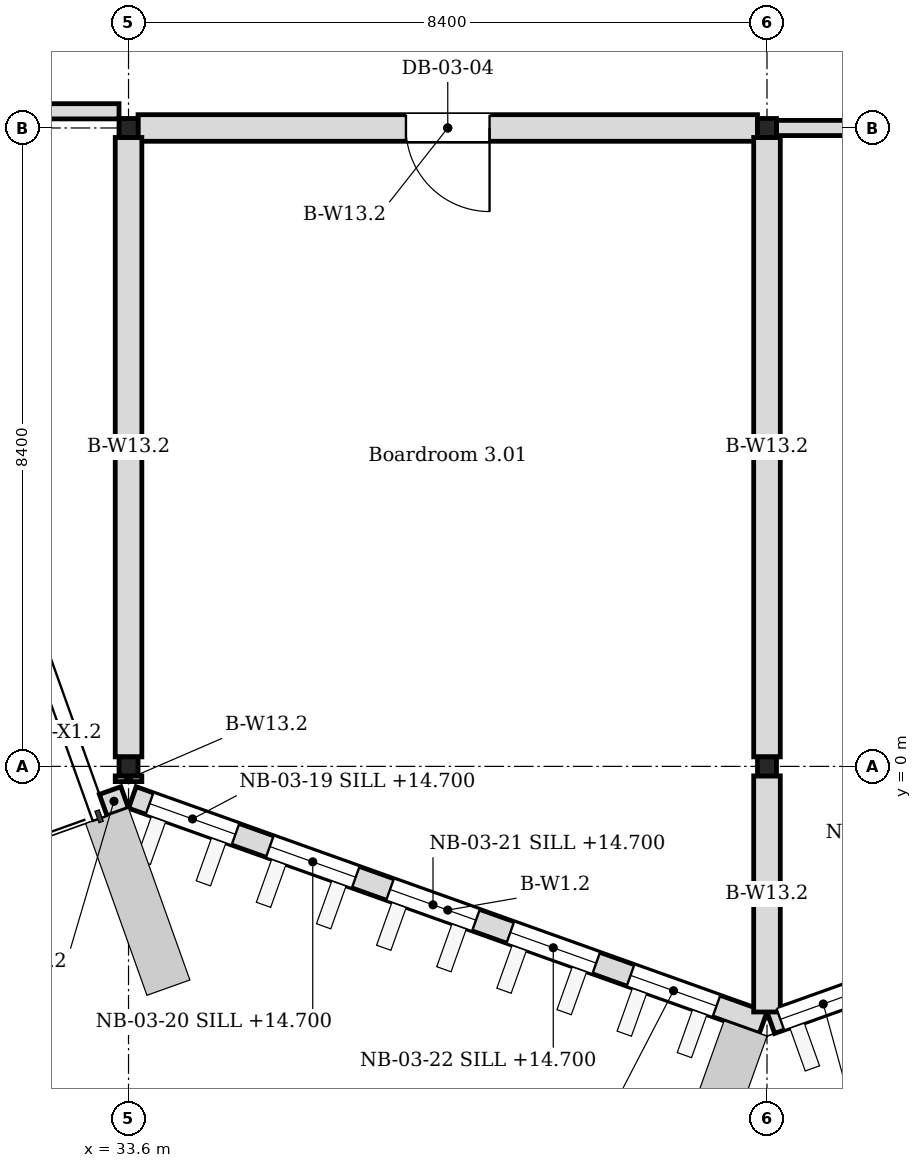
"""IFC4 building model, lengths in metres.
Left out: names, types, materials, properties, quantities, classifications, styles, units other than length and angle.
Written with IfcOpenShell. Run it as: python <this file> out.ifc"""

import sys

from ifc_helpers import new_model, si_unit, direction, frame, frame_2d, origin, origin_2d, place, context, subcontext, project, spatial, rectangle, i_section, extrude, element, fill, save


model = new_model("IFC4")
c1 = context("Model", 3, precision=1e-05, world=origin(), true_north=direction((0.0, 1.0)))
c2 = subcontext(c1, "Body", "Model", "MODEL_VIEW")
j1 = project(units=[si_unit("LENGTHUNIT", "METRE"), si_unit("PLANEANGLEUNIT", "RADIAN")], contexts=[c1])
p1 = place(None, origin())
s1 = spatial("IfcSite", under=j1, at=p1, CompositionType="ELEMENT")
p2 = place(p1, origin())
s2 = spatial("IfcBuilding", under=s1, at=p2, CompositionType="ELEMENT")
p3 = place(p2, frame((0.0, 0.0, 14.4)))
s3 = spatial("IfcBuildingStorey", under=s2, at=p3, CompositionType="ELEMENT", Elevation=14.4)
for number, where, z_axis, x_axis in (
    (1, (33.6, 0.0, 0.0), (0.0, 0.0, 1.0), (1.0, 0.0, 0.0)),
    (2, (33.6, 8.4, 0.0), (0.0, 0.0, 1.0), (1.0, 0.0, 0.0)),
    (3, (42.0, 0.0, 0.0), (0.0, 0.0, 1.0), (1.0, 0.0, 0.0)),
    (4, (42.0, 8.4, 0.0), (0.0, 0.0, 1.0), (1.0, 0.0, 0.0)),
):
    element("IfcColumn", number, at=place(p3, frame(where, z_axis=z_axis, x_axis=x_axis)), inside=s3, PredefinedType="COLUMN", context=c2, shape_type="SweptSolid", body=[
        extrude(i_section(OverallWidth=0.25, OverallDepth=0.25, WebThickness=0.009, FlangeThickness=0.014, FilletRadius=0.013, at=origin_2d()), origin(), (0.0, 0.0, 1.0), 3.95),
    ])
p4 = place(p3, frame((33.267, -0.51, 0.0), z_axis=(0.0, 0.0, 1.0), x_axis=(0.941797147708, 0.336181695768, 0.0)))
e5 = element("IfcWall", 5, at=p4, inside=s3, PredefinedType="SOLIDWALL", context=c2, shape_type="SweptSolid", body=[
    extrude(rectangle(XDim=0.3, YDim=0.3, at=frame_2d((0.15, 0.0))), origin(), (0.0, 0.0, 1.0), 3.95),
])
p5 = place(p3, frame((33.65, -0.409, 0.0), z_axis=(0.0, 0.0, 1.0), x_axis=(0.941736270411, -0.336352191894, 0.0)))
e6 = element("IfcWall", 6, at=p5, inside=s3, PredefinedType="SOLIDWALL", context=c2, shape_type="SweptSolid", body=[
    extrude(rectangle(XDim=8.812, YDim=0.3, at=frame_2d((4.406, 0.0))), origin(), (0.0, 0.0, 1.0), 3.95),
])
p6 = place(p5, frame((0.24, 0.0, 0.3)))
e7 = element("IfcOpeningElement", 7, at=p6, cuts=e6, PredefinedType="OPENING", context=c2, shape_type="SweptSolid", body=[
    extrude(rectangle(XDim=1.2, YDim=3.3, at=frame_2d((0.6, 1.65))), frame((0.0, 0.16, 0.0), z_axis=(0.0, -1.0, 0.0), x_axis=(1.0, 0.0, 0.0)), (0.0, 0.0, 1.0), 0.32),
])
p7 = place(p5, frame((1.92, 0.0, 0.3)))
e8 = element("IfcOpeningElement", 8, at=p7, cuts=e6, PredefinedType="OPENING", context=c2, shape_type="SweptSolid", body=[
    extrude(rectangle(XDim=1.2, YDim=3.3, at=frame_2d((0.6, 1.65))), frame((0.0, 0.16, 0.0), z_axis=(0.0, -1.0, 0.0), x_axis=(1.0, 0.0, 0.0)), (0.0, 0.0, 1.0), 0.32),
])
p8 = place(p5, frame((3.6, 0.0, 0.3)))
e9 = element("IfcOpeningElement", 9, at=p8, cuts=e6, PredefinedType="OPENING", context=c2, shape_type="SweptSolid", body=[
    extrude(rectangle(XDim=1.2, YDim=3.3, at=frame_2d((0.6, 1.65))), frame((0.0, 0.16, 0.0), z_axis=(0.0, -1.0, 0.0), x_axis=(1.0, 0.0, 0.0)), (0.0, 0.0, 1.0), 0.32),
])
p9 = place(p5, frame((5.28, 0.0, 0.3)))
e10 = element("IfcOpeningElement", 10, at=p9, cuts=e6, PredefinedType="OPENING", context=c2, shape_type="SweptSolid", body=[
    extrude(rectangle(XDim=1.2, YDim=3.3, at=frame_2d((0.6, 1.65))), frame((0.0, 0.16, 0.0), z_axis=(0.0, -1.0, 0.0), x_axis=(1.0, 0.0, 0.0)), (0.0, 0.0, 1.0), 0.32),
])
p10 = place(p5, frame((6.96, 0.0, 0.3)))
e11 = element("IfcOpeningElement", 11, at=p10, cuts=e6, PredefinedType="OPENING", context=c2, shape_type="SweptSolid", body=[
    extrude(rectangle(XDim=1.2, YDim=3.3, at=frame_2d((0.6, 1.65))), frame((0.0, 0.16, 0.0), z_axis=(0.0, -1.0, 0.0), x_axis=(1.0, 0.0, 0.0)), (0.0, 0.0, 1.0), 0.32),
])
p11 = place(p3, frame((42.051, -3.373, 0.0), z_axis=(0.0, 0.0, 1.0), x_axis=(0.941736270411, 0.336352191894, 0.0)))
e12 = element("IfcWall", 12, at=p11, inside=s3, PredefinedType="SOLIDWALL", context=c2, shape_type="SweptSolid", body=[
    extrude(rectangle(XDim=8.812, YDim=0.3, at=frame_2d((4.406, 0.0))), origin(), (0.0, 0.0, 1.0), 3.95),
])
p12 = place(p11, frame((0.133, 0.0, 0.3)))
e13 = element("IfcOpeningElement", 13, at=p12, cuts=e12, PredefinedType="OPENING", context=c2, shape_type="SweptSolid", body=[
    extrude(rectangle(XDim=1.2, YDim=3.3, at=frame_2d((0.6, 1.65))), frame((0.0, 0.16, 0.0), z_axis=(0.0, -1.0, 0.0), x_axis=(1.0, 0.0, 0.0)), (0.0, 0.0, 1.0), 0.32),
])
p13 = place(p11, frame((1.813, 0.0, 0.3)))
e14 = element("IfcOpeningElement", 14, at=p13, cuts=e12, PredefinedType="OPENING", context=c2, shape_type="SweptSolid", body=[
    extrude(rectangle(XDim=1.2, YDim=3.3, at=frame_2d((0.6, 1.65))), frame((0.0, 0.16, 0.0), z_axis=(0.0, -1.0, 0.0), x_axis=(1.0, 0.0, 0.0)), (0.0, 0.0, 1.0), 0.32),
])
p14 = place(p11, frame((3.493, 0.0, 0.3)))
e15 = element("IfcOpeningElement", 15, at=p14, cuts=e12, PredefinedType="OPENING", context=c2, shape_type="SweptSolid", body=[
    extrude(rectangle(XDim=1.2, YDim=3.3, at=frame_2d((0.6, 1.65))), frame((0.0, 0.16, 0.0), z_axis=(0.0, -1.0, 0.0), x_axis=(1.0, 0.0, 0.0)), (0.0, 0.0, 1.0), 0.32),
])
p15 = place(p11, frame((5.173, 0.0, 0.3)))
e16 = element("IfcOpeningElement", 16, at=p15, cuts=e12, PredefinedType="OPENING", context=c2, shape_type="SweptSolid", body=[
    extrude(rectangle(XDim=1.2, YDim=3.3, at=frame_2d((0.6, 1.65))), frame((0.0, 0.16, 0.0), z_axis=(0.0, -1.0, 0.0), x_axis=(1.0, 0.0, 0.0)), (0.0, 0.0, 1.0), 0.32),
])
p16 = place(p11, frame((6.853, 0.0, 0.3)))
e17 = element("IfcOpeningElement", 17, at=p16, cuts=e12, PredefinedType="OPENING", context=c2, shape_type="SweptSolid", body=[
    extrude(rectangle(XDim=1.2, YDim=3.3, at=frame_2d((0.6, 1.65))), frame((0.0, 0.16, 0.0), z_axis=(0.0, -1.0, 0.0), x_axis=(1.0, 0.0, 0.0)), (0.0, 0.0, 1.0), 0.32),
])
p17 = place(p3, frame((25.325, 8.619, 0.0), z_axis=(0.0, 0.0, 1.0), x_axis=(1.0, 0.0, 0.0)))
e18 = element("IfcWall", 18, at=p17, inside=s3, PredefinedType="PARTITIONING", context=c2, shape_type="SweptSolid", body=[
    extrude(rectangle(XDim=8.15, YDim=0.2, at=frame_2d((4.075, 0.0))), origin(), (0.0, 0.0, 1.0), 3.25),
])
p18 = place(p17, frame((0.875, 0.0, 0.0)))
e19 = element("IfcOpeningElement", 19, at=p18, cuts=e18, PredefinedType="OPENING", context=c2, shape_type="SweptSolid", body=[
    extrude(rectangle(XDim=1.0, YDim=2.1, at=frame_2d((0.5, 1.05))), frame((0.0, 0.11, 0.0), z_axis=(0.0, -1.0, 0.0), x_axis=(1.0, 0.0, 0.0)), (0.0, 0.0, 1.0), 0.22),
])
p19 = place(p3, frame((33.725, 8.4, 0.0), z_axis=(0.0, 0.0, 1.0), x_axis=(1.0, 0.0, 0.0)))
e20 = element("IfcWall", 20, at=p19, inside=s3, PredefinedType="PARTITIONING", context=c2, shape_type="SweptSolid", body=[
    extrude(rectangle(XDim=8.15, YDim=0.35, at=frame_2d((4.075, 0.0))), origin(), (0.0, 0.0, 1.0), 3.25),
])
p20 = place(p19, frame((3.525, 0.0, 0.0)))
e21 = element("IfcOpeningElement", 21, at=p20, cuts=e20, PredefinedType="OPENING", context=c2, shape_type="SweptSolid", body=[
    extrude(rectangle(XDim=1.1, YDim=2.4, at=frame_2d((0.55, 1.2))), frame((0.0, 0.185, 0.0), z_axis=(0.0, -1.0, 0.0), x_axis=(1.0, 0.0, 0.0)), (0.0, 0.0, 1.0), 0.37),
])
p21 = place(p3, frame((42.125, 8.4, 0.0), z_axis=(0.0, 0.0, 1.0), x_axis=(1.0, 0.0, 0.0)))
e22 = element("IfcWall", 22, at=p21, inside=s3, PredefinedType="PARTITIONING", context=c2, shape_type="SweptSolid", body=[
    extrude(rectangle(XDim=8.15, YDim=0.2, at=frame_2d((4.075, 0.0))), origin(), (0.0, 0.0, 1.0), 3.25),
])
p22 = place(p21, frame((2.875, 0.0, 0.0)))
e23 = element("IfcOpeningElement", 23, at=p22, cuts=e22, PredefinedType="OPENING", context=c2, shape_type="SweptSolid", body=[
    extrude(rectangle(XDim=2.4, YDim=2.2, at=frame_2d((1.2, 1.1))), frame((0.0, 0.11, 0.0), z_axis=(0.0, -1.0, 0.0), x_axis=(1.0, 0.0, 0.0)), (0.0, 0.0, 1.0), 0.22),
])
p23 = place(p3, frame((33.6, -0.2, 0.0), z_axis=(0.0, 0.0, 1.0), x_axis=(0.0, 1.0, 0.0)))
e24 = element("IfcWall", 24, at=p23, inside=s3, PredefinedType="PARTITIONING", context=c2, shape_type="SweptSolid", body=[
    extrude(rectangle(XDim=0.075, YDim=0.35, at=frame_2d((0.038, 0.0))), origin(), (0.0, 0.0, 1.0), 3.25),
])
p24 = place(p3, frame((33.6, 0.125, 0.0), z_axis=(0.0, 0.0, 1.0), x_axis=(0.0, 1.0, 0.0)))
e25 = element("IfcWall", 25, at=p24, inside=s3, PredefinedType="PARTITIONING", context=c2, shape_type="SweptSolid", body=[
    extrude(rectangle(XDim=8.15, YDim=0.35, at=frame_2d((4.075, 0.0))), origin(), (0.0, 0.0, 1.0), 3.25),
])
p25 = place(p3, frame((42.0, -3.231, 0.0), z_axis=(0.0, 0.0, 1.0), x_axis=(0.0, 1.0, 0.0)))
e26 = element("IfcWall", 26, at=p25, inside=s3, PredefinedType="PARTITIONING", context=c2, shape_type="SweptSolid", body=[
    extrude(rectangle(XDim=3.106, YDim=0.35, at=frame_2d((1.553, 0.0))), origin(), (0.0, 0.0, 1.0), 3.25),
])
p26 = place(p3, frame((42.0, 0.125, 0.0), z_axis=(0.0, 0.0, 1.0), x_axis=(0.0, 1.0, 0.0)))
e27 = element("IfcWall", 27, at=p26, inside=s3, PredefinedType="PARTITIONING", context=c2, shape_type="SweptSolid", body=[
    extrude(rectangle(XDim=8.15, YDim=0.35, at=frame_2d((4.075, 0.0))), origin(), (0.0, 0.0, 1.0), 3.25),
])
p27 = place(p6, origin())
e28 = element("IfcWindow", 28, at=p27, inside=s3, PartitioningType="TRIPLE_PANEL_VERTICAL", PredefinedType="WINDOW", context=c2, shape_type="SweptSolid", body=[
    extrude(rectangle(XDim=1.2, YDim=3.3, at=frame_2d((0.6, 1.65))), frame((0.0, 0.03, 0.0), z_axis=(0.0, -1.0, 0.0), x_axis=(1.0, 0.0, 0.0)), (0.0, 0.0, 1.0), 0.06),
])
fill(e7, e28)
p28 = place(p7, origin())
e29 = element("IfcWindow", 29, at=p28, inside=s3, PartitioningType="TRIPLE_PANEL_VERTICAL", PredefinedType="WINDOW", context=c2, shape_type="SweptSolid", body=[
    extrude(rectangle(XDim=1.2, YDim=3.3, at=frame_2d((0.6, 1.65))), frame((0.0, 0.03, 0.0), z_axis=(0.0, -1.0, 0.0), x_axis=(1.0, 0.0, 0.0)), (0.0, 0.0, 1.0), 0.06),
])
fill(e8, e29)
p29 = place(p8, origin())
e30 = element("IfcWindow", 30, at=p29, inside=s3, PartitioningType="TRIPLE_PANEL_VERTICAL", PredefinedType="WINDOW", context=c2, shape_type="SweptSolid", body=[
    extrude(rectangle(XDim=1.2, YDim=3.3, at=frame_2d((0.6, 1.65))), frame((0.0, 0.03, 0.0), z_axis=(0.0, -1.0, 0.0), x_axis=(1.0, 0.0, 0.0)), (0.0, 0.0, 1.0), 0.06),
])
fill(e9, e30)
p30 = place(p9, origin())
e31 = element("IfcWindow", 31, at=p30, inside=s3, PartitioningType="TRIPLE_PANEL_VERTICAL", PredefinedType="WINDOW", context=c2, shape_type="SweptSolid", body=[
    extrude(rectangle(XDim=1.2, YDim=3.3, at=frame_2d((0.6, 1.65))), frame((0.0, 0.03, 0.0), z_axis=(0.0, -1.0, 0.0), x_axis=(1.0, 0.0, 0.0)), (0.0, 0.0, 1.0), 0.06),
])
fill(e10, e31)
p31 = place(p10, origin())
e32 = element("IfcWindow", 32, at=p31, inside=s3, PartitioningType="TRIPLE_PANEL_VERTICAL", PredefinedType="WINDOW", context=c2, shape_type="SweptSolid", body=[
    extrude(rectangle(XDim=1.2, YDim=3.3, at=frame_2d((0.6, 1.65))), frame((0.0, 0.03, 0.0), z_axis=(0.0, -1.0, 0.0), x_axis=(1.0, 0.0, 0.0)), (0.0, 0.0, 1.0), 0.06),
])
fill(e11, e32)
p32 = place(p12, origin())
e33 = element("IfcWindow", 33, at=p32, inside=s3, PartitioningType="TRIPLE_PANEL_VERTICAL", PredefinedType="WINDOW", context=c2, shape_type="SweptSolid", body=[
    extrude(rectangle(XDim=1.2, YDim=3.3, at=frame_2d((0.6, 1.65))), frame((0.0, 0.03, 0.0), z_axis=(0.0, -1.0, 0.0), x_axis=(1.0, 0.0, 0.0)), (0.0, 0.0, 1.0), 0.06),
])
fill(e13, e33)
p33 = place(p20, origin())
e34 = element("IfcDoor", 34, at=p33, inside=s3, OperationType="SINGLE_SWING_LEFT", PredefinedType="DOOR", context=c2, shape_type="SweptSolid", body=[
    extrude(rectangle(XDim=1.1, YDim=2.4, at=frame_2d((0.55, 1.2))), frame((0.0, 0.025, 0.0), z_axis=(0.0, -1.0, 0.0), x_axis=(1.0, 0.0, 0.0)), (0.0, 0.0, 1.0), 0.05),
])
fill(e21, e34)
save(model, sys.argv[1])
